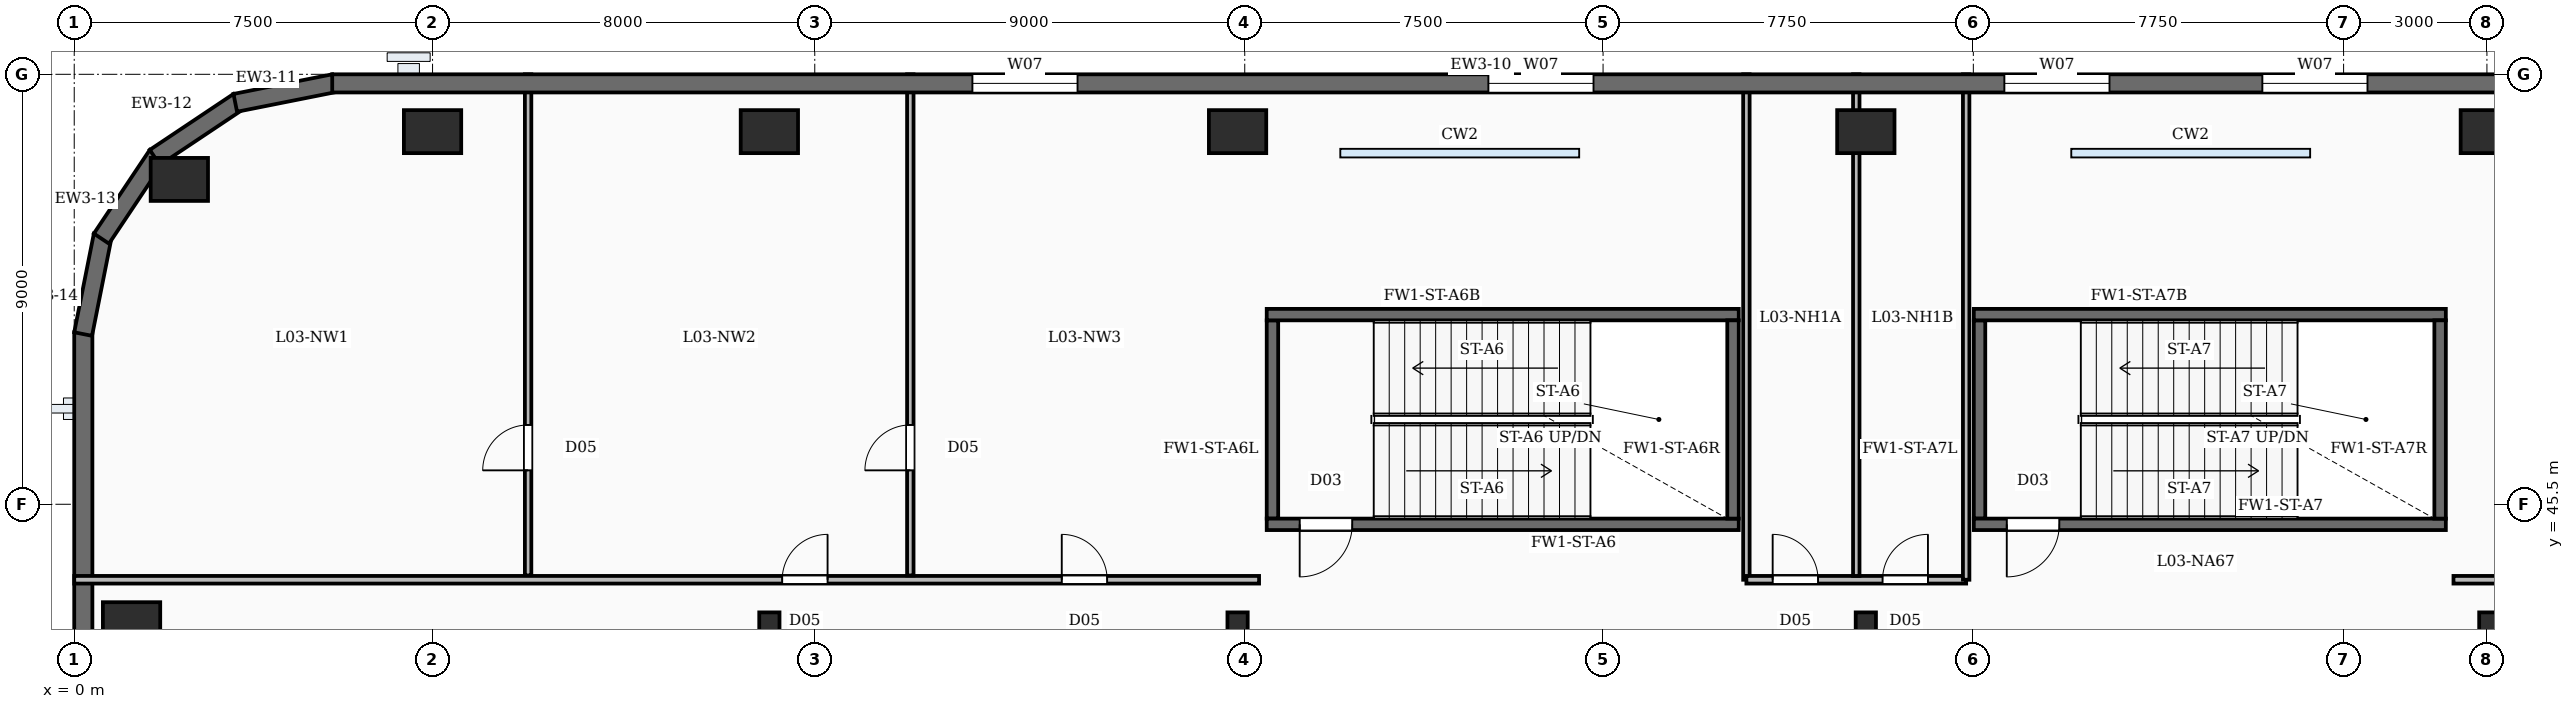
"""IFC4 building model, lengths in metres.
Left out: names, types, materials, properties, quantities, classifications, styles, units other than length and angle.
Written with IfcOpenShell. Run it as: python <this file> out.ifc"""

import sys

from ifc_helpers import new_model, si_unit, direction, frame, frame_2d, origin, origin_2d, place, context, subcontext, project, spatial, rectangle, i_section, extrude, element, fill, save


model = new_model("IFC4")
c1 = context("Model", 3, precision=1e-05, world=origin(), true_north=direction((0.0, 1.0)))
c2 = subcontext(c1, "Body", "Model", "MODEL_VIEW")
j1 = project(units=[si_unit("LENGTHUNIT", "METRE"), si_unit("PLANEANGLEUNIT", "RADIAN")], contexts=[c1])
p1 = place(None, origin())
s1 = spatial("IfcSite", under=j1, at=p1, CompositionType="ELEMENT")
p2 = place(p1, origin())
s2 = spatial("IfcBuilding", under=s1, at=p2, CompositionType="ELEMENT")
p3 = place(p2, frame((0.0, 0.0, 18.0)))
s3 = spatial("IfcBuildingStorey", under=s2, at=p3, CompositionType="ELEMENT", Elevation=18.0)
for number, where, z_axis, x_axis in (
    (1, (50.55, 53.3, -0.35), (0.0, 0.0, 1.0), (1.0, 0.0, 0.0)),
    (2, (37.5, 53.3, -0.35), (0.0, 0.0, 1.0), (1.0, 0.0, 0.0)),
    (3, (24.35, 53.3, -0.35), (0.0, 0.0, 1.0), (1.0, 0.0, 0.0)),
    (4, (14.55, 53.3, -0.35), (0.0, 0.0, 1.0), (1.0, 0.0, 0.0)),
    (5, (7.5, 53.3, -0.35), (0.0, 0.0, 1.0), (1.0, 0.0, 0.0)),
    (6, (2.2, 52.3, -0.35), (0.0, 0.0, 1.0), (1.0, 0.0, 0.0)),
    (7, (1.2, 43.0, -0.35), (0.0, 0.0, 1.0), (1.0, 0.0, 0.0)),
):
    element("IfcColumn", number, at=place(p3, frame(where, z_axis=z_axis, x_axis=x_axis)), inside=s3, PredefinedType="COLUMN", context=c2, shape_type="SweptSolid", body=[
        extrude(rectangle(XDim=1.2, YDim=0.9, at=origin_2d()), origin(), (0.0, 0.0, 1.0), 5.0),
    ])
for number, where, z_axis, x_axis in (
    (8, (14.55, 43.0, -0.35), (0.0, 0.0, 1.0), (1.0, 0.0, 0.0)),
    (9, (24.35, 43.0, -0.35), (0.0, 0.0, 1.0), (1.0, 0.0, 0.0)),
    (10, (37.5, 43.0, -0.35), (0.0, 0.0, 1.0), (1.0, 0.0, 0.0)),
    (11, (50.55, 43.0, -0.35), (0.0, 0.0, 1.0), (1.0, 0.0, 0.0)),
):
    element("IfcColumn", number, at=place(p3, frame(where, z_axis=z_axis, x_axis=x_axis)), inside=s3, PredefinedType="COLUMN", context=c2, shape_type="SweptSolid", body=[
        extrude(i_section(OverallWidth=0.424, OverallDepth=0.474, WebThickness=0.048, FlangeThickness=0.077, FilletRadius=0.02, at=origin_2d()), origin(), (0.0, 0.0, 1.0), 5.0),
    ])
p4 = place(p3, frame((5.4, 54.31, 0.0), z_axis=(0.0, 0.0, 1.0), x_axis=(1.0, 0.0, 0.0)))
e12 = element("IfcWall", 12, at=p4, inside=s3, PredefinedType="SOLIDWALL", context=c2, shape_type="SweptSolid", body=[
    extrude(rectangle(XDim=68.7, YDim=0.38, at=frame_2d((34.35, 0.0))), origin(), (0.0, 0.0, 1.0), 4.65),
])
p5 = place(p4, frame((13.4, 0.0, 0.95)))
e13 = element("IfcOpeningElement", 13, at=p5, cuts=e12, PredefinedType="OPENING", context=c2, shape_type="SweptSolid", body=[
    extrude(rectangle(XDim=2.2, YDim=2.5, at=frame_2d((1.1, 1.25))), frame((0.0, 0.2, 0.0), z_axis=(0.0, -1.0, 0.0), x_axis=(1.0, 0.0, 0.0)), (0.0, 0.0, 1.0), 0.4),
])
p6 = place(p4, frame((24.2, 0.0, 0.95)))
e14 = element("IfcOpeningElement", 14, at=p6, cuts=e12, PredefinedType="OPENING", context=c2, shape_type="SweptSolid", body=[
    extrude(rectangle(XDim=2.2, YDim=2.5, at=frame_2d((1.1, 1.25))), frame((0.0, 0.2, 0.0), z_axis=(0.0, -1.0, 0.0), x_axis=(1.0, 0.0, 0.0)), (0.0, 0.0, 1.0), 0.4),
])
p7 = place(p4, frame((35.0, 0.0, 0.95)))
e15 = element("IfcOpeningElement", 15, at=p7, cuts=e12, PredefinedType="OPENING", context=c2, shape_type="SweptSolid", body=[
    extrude(rectangle(XDim=2.2, YDim=2.5, at=frame_2d((1.1, 1.25))), frame((0.0, 0.2, 0.0), z_axis=(0.0, -1.0, 0.0), x_axis=(1.0, 0.0, 0.0)), (0.0, 0.0, 1.0), 0.4),
])
p8 = place(p4, frame((40.4, 0.0, 0.95)))
e16 = element("IfcOpeningElement", 16, at=p8, cuts=e12, PredefinedType="OPENING", context=c2, shape_type="SweptSolid", body=[
    extrude(rectangle(XDim=2.2, YDim=2.5, at=frame_2d((1.1, 1.25))), frame((0.0, 0.2, 0.0), z_axis=(0.0, -1.0, 0.0), x_axis=(1.0, 0.0, 0.0)), (0.0, 0.0, 1.0), 0.4),
])
p9 = place(p4, frame((56.6, 0.0, 0.95)))
e17 = element("IfcOpeningElement", 17, at=p9, cuts=e12, PredefinedType="OPENING", context=c2, shape_type="SweptSolid", body=[
    extrude(rectangle(XDim=2.2, YDim=2.5, at=frame_2d((1.1, 1.25))), frame((0.0, 0.2, 0.0), z_axis=(0.0, -1.0, 0.0), x_axis=(1.0, 0.0, 0.0)), (0.0, 0.0, 1.0), 0.4),
])
p10 = place(p4, frame((62.0, 0.0, 0.95)))
e18 = element("IfcOpeningElement", 18, at=p10, cuts=e12, PredefinedType="OPENING", context=c2, shape_type="SweptSolid", body=[
    extrude(rectangle(XDim=2.2, YDim=2.5, at=frame_2d((1.1, 1.25))), frame((0.0, 0.2, 0.0), z_axis=(0.0, -1.0, 0.0), x_axis=(1.0, 0.0, 0.0)), (0.0, 0.0, 1.0), 0.4),
])
for number, where, z_axis, x_axis in (
    (19, (3.371, 53.903, 0.0), (0.0, 0.0, 1.0), (0.981, 0.195, 0.0)),
    (20, (1.687, 52.76, 0.0), (0.0, 0.0, 1.0), (0.832, 0.556, 0.0)),
    (21, (0.569, 51.061, 0.0), (0.0, 0.0, 1.0), (0.556, 0.832, 0.0)),
    (22, (0.186, 49.063, 0.0), (0.0, 0.0, 1.0), (0.195, 0.981, 0.0)),
):
    element("IfcWall", number, at=place(p3, frame(where, z_axis=z_axis, x_axis=x_axis)), inside=s3, PredefinedType="SOLIDWALL", context=c2, shape_type="SweptSolid", body=[
        extrude(rectangle(XDim=2.107, YDim=0.38, at=frame_2d((1.053, 0.0))), origin(), (0.0, 0.0, 1.0), 4.65),
    ])
p11 = place(p3, frame((0.19, 5.4, 0.0), z_axis=(0.0, 0.0, 1.0), x_axis=(0.0, 1.0, 0.0)))
e23 = element("IfcWall", 23, at=p11, inside=s3, PredefinedType="SOLIDWALL", context=c2, shape_type="SweptSolid", body=[
    extrude(rectangle(XDim=43.7, YDim=0.38, at=frame_2d((21.85, 0.0))), origin(), (0.0, 0.0, 1.0), 4.65),
])
p12 = place(p11, frame((2.6, 0.0, 0.95)))
e24 = element("IfcOpeningElement", 24, at=p12, cuts=e23, PredefinedType="OPENING", context=c2, shape_type="SweptSolid", body=[
    extrude(rectangle(XDim=2.2, YDim=2.5, at=frame_2d((1.1, 1.25))), frame((0.0, 0.2, 0.0), z_axis=(0.0, -1.0, 0.0), x_axis=(1.0, 0.0, 0.0)), (0.0, 0.0, 1.0), 0.4),
])
p13 = place(p11, frame((8.0, 0.0, 0.95)))
e25 = element("IfcOpeningElement", 25, at=p13, cuts=e23, PredefinedType="OPENING", context=c2, shape_type="SweptSolid", body=[
    extrude(rectangle(XDim=2.2, YDim=2.5, at=frame_2d((1.1, 1.25))), frame((0.0, 0.2, 0.0), z_axis=(0.0, -1.0, 0.0), x_axis=(1.0, 0.0, 0.0)), (0.0, 0.0, 1.0), 0.4),
])
p14 = place(p11, frame((18.8, 0.0, 0.95)))
e26 = element("IfcOpeningElement", 26, at=p14, cuts=e23, PredefinedType="OPENING", context=c2, shape_type="SweptSolid", body=[
    extrude(rectangle(XDim=2.2, YDim=2.5, at=frame_2d((1.1, 1.25))), frame((0.0, 0.2, 0.0), z_axis=(0.0, -1.0, 0.0), x_axis=(1.0, 0.0, 0.0)), (0.0, 0.0, 1.0), 0.4),
])
p15 = place(p11, frame((29.6, 0.0, 0.95)))
e27 = element("IfcOpeningElement", 27, at=p15, cuts=e23, PredefinedType="OPENING", context=c2, shape_type="SweptSolid", body=[
    extrude(rectangle(XDim=2.2, YDim=2.5, at=frame_2d((1.1, 1.25))), frame((0.0, 0.2, 0.0), z_axis=(0.0, -1.0, 0.0), x_axis=(1.0, 0.0, 0.0)), (0.0, 0.0, 1.0), 0.4),
])
p16 = place(p3, frame((34.84, 45.08, 0.0), z_axis=(0.0, 0.0, 1.0), x_axis=(-1.0, 0.0, 0.0)))
e28 = element("IfcWall", 28, at=p16, inside=s3, PredefinedType="SOLIDWALL", context=c2, shape_type="SweptSolid", body=[
    extrude(rectangle(XDim=9.88, YDim=0.24, at=frame_2d((4.94, 0.0))), origin(), (0.0, 0.0, 1.0), 4.65),
])
p17 = place(p16, frame((8.09, 0.0, 0.0)))
e29 = element("IfcOpeningElement", 29, at=p17, cuts=e28, PredefinedType="OPENING", context=c2, shape_type="SweptSolid", body=[
    extrude(rectangle(XDim=1.1, YDim=2.15, at=frame_2d((0.55, 1.075))), frame((0.0, 0.13, 0.0), z_axis=(0.0, -1.0, 0.0), x_axis=(1.0, 0.0, 0.0)), (0.0, 0.0, 1.0), 0.26),
])
p18 = place(p3, frame((24.96, 49.47, 0.0), z_axis=(0.0, 0.0, 1.0), x_axis=(1.0, 0.0, 0.0)))
e30 = element("IfcWall", 30, at=p18, inside=s3, PredefinedType="SOLIDWALL", context=c2, shape_type="SweptSolid", body=[
    extrude(rectangle(XDim=9.88, YDim=0.24, at=frame_2d((4.94, 0.0))), origin(), (0.0, 0.0, 1.0), 4.65),
])
for number, where, z_axis, x_axis in (
    (31, (25.08, 45.2, 0.0), (0.0, 0.0, 1.0), (0.0, 1.0, 0.0)),
    (32, (34.72, 45.2, 0.0), (0.0, 0.0, 1.0), (0.0, 1.0, 0.0)),
):
    element("IfcWall", number, at=place(p3, frame(where, z_axis=z_axis, x_axis=x_axis)), inside=s3, PredefinedType="SOLIDWALL", context=c2, shape_type="SweptSolid", body=[
        extrude(rectangle(XDim=4.15, YDim=0.24, at=frame_2d((2.075, 0.0))), origin(), (0.0, 0.0, 1.0), 4.65),
    ])
p19 = place(p3, frame((49.64, 45.08, 0.0), z_axis=(0.0, 0.0, 1.0), x_axis=(-1.0, 0.0, 0.0)))
e33 = element("IfcWall", 33, at=p19, inside=s3, PredefinedType="SOLIDWALL", context=c2, shape_type="SweptSolid", body=[
    extrude(rectangle(XDim=9.88, YDim=0.24, at=frame_2d((4.94, 0.0))), origin(), (0.0, 0.0, 1.0), 4.65),
])
p20 = place(p19, frame((8.09, 0.0, 0.0)))
e34 = element("IfcOpeningElement", 34, at=p20, cuts=e33, PredefinedType="OPENING", context=c2, shape_type="SweptSolid", body=[
    extrude(rectangle(XDim=1.1, YDim=2.15, at=frame_2d((0.55, 1.075))), frame((0.0, 0.13, 0.0), z_axis=(0.0, -1.0, 0.0), x_axis=(1.0, 0.0, 0.0)), (0.0, 0.0, 1.0), 0.26),
])
p21 = place(p3, frame((39.76, 49.47, 0.0), z_axis=(0.0, 0.0, 1.0), x_axis=(1.0, 0.0, 0.0)))
e35 = element("IfcWall", 35, at=p21, inside=s3, PredefinedType="SOLIDWALL", context=c2, shape_type="SweptSolid", body=[
    extrude(rectangle(XDim=9.88, YDim=0.24, at=frame_2d((4.94, 0.0))), origin(), (0.0, 0.0, 1.0), 4.65),
])
for number, where, z_axis, x_axis in (
    (36, (39.88, 45.2, 0.0), (0.0, 0.0, 1.0), (0.0, 1.0, 0.0)),
    (37, (49.52, 45.2, 0.0), (0.0, 0.0, 1.0), (0.0, 1.0, 0.0)),
):
    element("IfcWall", number, at=place(p3, frame(where, z_axis=z_axis, x_axis=x_axis)), inside=s3, PredefinedType="SOLIDWALL", context=c2, shape_type="SweptSolid", body=[
        extrude(rectangle(XDim=4.15, YDim=0.24, at=frame_2d((2.075, 0.0))), origin(), (0.0, 0.0, 1.0), 4.65),
    ])
p22 = place(p3, frame((9.5, 44.01, 0.0), z_axis=(0.0, 0.0, 1.0), x_axis=(0.0, 1.0, 0.0)))
e38 = element("IfcWall", 38, at=p22, inside=s3, PredefinedType="PARTITIONING", context=c2, shape_type="SweptSolid", body=[
    extrude(rectangle(XDim=10.49, YDim=0.135, at=frame_2d((5.245, 0.0))), origin(), (0.0, 0.0, 1.0), 3.71),
])
p23 = place(p22, frame((2.2, 0.0, 0.0)))
e39 = element("IfcOpeningElement", 39, at=p23, cuts=e38, PredefinedType="OPENING", context=c2, shape_type="SweptSolid", body=[
    extrude(rectangle(XDim=0.95, YDim=2.15, at=frame_2d((0.475, 1.075))), frame((0.0, 0.077, 0.0), z_axis=(0.0, -1.0, 0.0), x_axis=(1.0, 0.0, 0.0)), (0.0, 0.0, 1.0), 0.155),
])
p24 = place(p3, frame((17.5, 44.01, 0.0), z_axis=(0.0, 0.0, 1.0), x_axis=(0.0, 1.0, 0.0)))
e40 = element("IfcWall", 40, at=p24, inside=s3, PredefinedType="PARTITIONING", context=c2, shape_type="SweptSolid", body=[
    extrude(rectangle(XDim=10.49, YDim=0.135, at=frame_2d((5.245, 0.0))), origin(), (0.0, 0.0, 1.0), 3.71),
])
p25 = place(p24, frame((2.2, 0.0, 0.0)))
e41 = element("IfcOpeningElement", 41, at=p25, cuts=e40, PredefinedType="OPENING", context=c2, shape_type="SweptSolid", body=[
    extrude(rectangle(XDim=0.95, YDim=2.15, at=frame_2d((0.475, 1.075))), frame((0.0, 0.077, 0.0), z_axis=(0.0, -1.0, 0.0), x_axis=(1.0, 0.0, 0.0)), (0.0, 0.0, 1.0), 0.155),
])
p26 = place(p3, frame((0.0, 43.92, 0.0), z_axis=(0.0, 0.0, 1.0), x_axis=(1.0, 0.0, 0.0)))
e42 = element("IfcWall", 42, at=p26, inside=s3, PredefinedType="PARTITIONING", context=c2, shape_type="SweptSolid", body=[
    extrude(rectangle(XDim=24.8, YDim=0.16, at=frame_2d((12.4, 0.0))), origin(), (0.0, 0.0, 1.0), 3.71),
])
p27 = place(p26, frame((14.818, 0.0, 0.0)))
e43 = element("IfcOpeningElement", 43, at=p27, cuts=e42, PredefinedType="OPENING", context=c2, shape_type="SweptSolid", body=[
    extrude(rectangle(XDim=0.95, YDim=2.15, at=frame_2d((0.475, 1.075))), frame((0.0, 0.09, 0.0), z_axis=(0.0, -1.0, 0.0), x_axis=(1.0, 0.0, 0.0)), (0.0, 0.0, 1.0), 0.18),
])
p28 = place(p26, frame((20.67, 0.0, 0.0)))
e44 = element("IfcOpeningElement", 44, at=p28, cuts=e42, PredefinedType="OPENING", context=c2, shape_type="SweptSolid", body=[
    extrude(rectangle(XDim=0.95, YDim=2.15, at=frame_2d((0.475, 1.075))), frame((0.0, 0.09, 0.0), z_axis=(0.0, -1.0, 0.0), x_axis=(1.0, 0.0, 0.0)), (0.0, 0.0, 1.0), 0.18),
])
p29 = place(p3, frame((49.8, 43.92, 0.0), z_axis=(0.0, 0.0, 1.0), x_axis=(1.0, 0.0, 0.0)))
e45 = element("IfcWall", 45, at=p29, inside=s3, PredefinedType="PARTITIONING", context=c2, shape_type="SweptSolid", body=[
    extrude(rectangle(XDim=29.7, YDim=0.16, at=frame_2d((14.85, 0.0))), origin(), (0.0, 0.0, 1.0), 3.71),
])
p30 = place(p29, frame((3.62, 0.0, 0.0)))
e46 = element("IfcOpeningElement", 46, at=p30, cuts=e45, PredefinedType="OPENING", context=c2, shape_type="SweptSolid", body=[
    extrude(rectangle(XDim=0.95, YDim=2.15, at=frame_2d((0.475, 1.075))), frame((0.0, 0.09, 0.0), z_axis=(0.0, -1.0, 0.0), x_axis=(1.0, 0.0, 0.0)), (0.0, 0.0, 1.0), 0.18),
])
p31 = place(p29, frame((11.97, 0.0, 0.0)))
e47 = element("IfcOpeningElement", 47, at=p31, cuts=e45, PredefinedType="OPENING", context=c2, shape_type="SweptSolid", body=[
    extrude(rectangle(XDim=0.95, YDim=2.15, at=frame_2d((0.475, 1.075))), frame((0.0, 0.09, 0.0), z_axis=(0.0, -1.0, 0.0), x_axis=(1.0, 0.0, 0.0)), (0.0, 0.0, 1.0), 0.18),
])
p32 = place(p29, frame((19.52, 0.0, 0.0)))
e48 = element("IfcOpeningElement", 48, at=p32, cuts=e45, PredefinedType="OPENING", context=c2, shape_type="SweptSolid", body=[
    extrude(rectangle(XDim=0.95, YDim=2.15, at=frame_2d((0.475, 1.075))), frame((0.0, 0.09, 0.0), z_axis=(0.0, -1.0, 0.0), x_axis=(1.0, 0.0, 0.0)), (0.0, 0.0, 1.0), 0.18),
])
p33 = place(p3, frame((35.0, 43.92, 0.0), z_axis=(0.0, 0.0, 1.0), x_axis=(1.0, 0.0, 0.0)))
e49 = element("IfcWall", 49, at=p33, inside=s3, PredefinedType="PARTITIONING", context=c2, shape_type="SweptSolid", body=[
    extrude(rectangle(XDim=4.6, YDim=0.16, at=frame_2d((2.3, 0.0))), origin(), (0.0, 0.0, 1.0), 3.71),
])
p34 = place(p33, frame((0.55, 0.0, 0.0)))
e50 = element("IfcOpeningElement", 50, at=p34, cuts=e49, PredefinedType="OPENING", context=c2, shape_type="SweptSolid", body=[
    extrude(rectangle(XDim=0.95, YDim=2.15, at=frame_2d((0.475, 1.075))), frame((0.0, 0.09, 0.0), z_axis=(0.0, -1.0, 0.0), x_axis=(1.0, 0.0, 0.0)), (0.0, 0.0, 1.0), 0.18),
])
p35 = place(p33, frame((2.85, 0.0, 0.0)))
e51 = element("IfcOpeningElement", 51, at=p35, cuts=e49, PredefinedType="OPENING", context=c2, shape_type="SweptSolid", body=[
    extrude(rectangle(XDim=0.95, YDim=2.15, at=frame_2d((0.475, 1.075))), frame((0.0, 0.09, 0.0), z_axis=(0.0, -1.0, 0.0), x_axis=(1.0, 0.0, 0.0)), (0.0, 0.0, 1.0), 0.18),
])
p36 = place(p3, frame((37.3, 44.0, 0.0), z_axis=(0.0, 0.0, 1.0), x_axis=(0.0, 1.0, 0.0)))
e52 = element("IfcWall", 52, at=p36, inside=s3, PredefinedType="PARTITIONING", context=c2, shape_type="SweptSolid", body=[
    extrude(rectangle(XDim=10.5, YDim=0.135, at=frame_2d((5.25, 0.0))), origin(), (0.0, 0.0, 1.0), 3.71),
])
for number, where, z_axis, x_axis in (
    (53, (35.0, 43.92, 0.0), (0.0, 0.0, 1.0), (0.0, 1.0, 0.0)),
    (54, (39.6, 43.92, 0.0), (0.0, 0.0, 1.0), (0.0, 1.0, 0.0)),
):
    element("IfcWall", number, at=place(p3, frame(where, z_axis=z_axis, x_axis=x_axis)), inside=s3, PredefinedType="PARTITIONING", context=c2, shape_type="SweptSolid", body=[
        extrude(rectangle(XDim=10.58, YDim=0.135, at=frame_2d((5.29, 0.0))), origin(), (0.0, 0.0, 1.0), 3.71),
    ])
p37 = place(p5, origin())
e55 = element("IfcWindow", 55, at=p37, inside=s3, PartitioningType="DOUBLE_PANEL_VERTICAL", PredefinedType="WINDOW", context=c2, shape_type="SweptSolid", body=[
    extrude(rectangle(XDim=2.2, YDim=2.5, at=frame_2d((1.1, 1.25))), frame((0.0, 0.03, 0.0), z_axis=(0.0, -1.0, 0.0), x_axis=(1.0, 0.0, 0.0)), (0.0, 0.0, 1.0), 0.06),
])
fill(e13, e55)
p38 = place(p6, origin())
e56 = element("IfcWindow", 56, at=p38, inside=s3, PartitioningType="DOUBLE_PANEL_VERTICAL", PredefinedType="WINDOW", context=c2, shape_type="SweptSolid", body=[
    extrude(rectangle(XDim=2.2, YDim=2.5, at=frame_2d((1.1, 1.25))), frame((0.0, 0.03, 0.0), z_axis=(0.0, -1.0, 0.0), x_axis=(1.0, 0.0, 0.0)), (0.0, 0.0, 1.0), 0.06),
])
fill(e14, e56)
p39 = place(p7, origin())
e57 = element("IfcWindow", 57, at=p39, inside=s3, PartitioningType="DOUBLE_PANEL_VERTICAL", PredefinedType="WINDOW", context=c2, shape_type="SweptSolid", body=[
    extrude(rectangle(XDim=2.2, YDim=2.5, at=frame_2d((1.1, 1.25))), frame((0.0, 0.03, 0.0), z_axis=(0.0, -1.0, 0.0), x_axis=(1.0, 0.0, 0.0)), (0.0, 0.0, 1.0), 0.06),
])
fill(e15, e57)
p40 = place(p8, origin())
e58 = element("IfcWindow", 58, at=p40, inside=s3, PartitioningType="DOUBLE_PANEL_VERTICAL", PredefinedType="WINDOW", context=c2, shape_type="SweptSolid", body=[
    extrude(rectangle(XDim=2.2, YDim=2.5, at=frame_2d((1.1, 1.25))), frame((0.0, 0.03, 0.0), z_axis=(0.0, -1.0, 0.0), x_axis=(1.0, 0.0, 0.0)), (0.0, 0.0, 1.0), 0.06),
])
fill(e16, e58)
p41 = place(p17, origin())
e59 = element("IfcDoor", 59, at=p41, inside=s3, OperationType="SINGLE_SWING_RIGHT", PredefinedType="DOOR", context=c2, shape_type="SweptSolid", body=[
    extrude(rectangle(XDim=1.1, YDim=2.15, at=frame_2d((0.55, 1.075))), frame((0.0, 0.025, 0.0), z_axis=(0.0, -1.0, 0.0), x_axis=(1.0, 0.0, 0.0)), (0.0, 0.0, 1.0), 0.05),
])
fill(e29, e59)
p42 = place(p20, origin())
e60 = element("IfcDoor", 60, at=p42, inside=s3, OperationType="SINGLE_SWING_RIGHT", PredefinedType="DOOR", context=c2, shape_type="SweptSolid", body=[
    extrude(rectangle(XDim=1.1, YDim=2.15, at=frame_2d((0.55, 1.075))), frame((0.0, 0.025, 0.0), z_axis=(0.0, -1.0, 0.0), x_axis=(1.0, 0.0, 0.0)), (0.0, 0.0, 1.0), 0.05),
])
fill(e34, e60)
p43 = place(p23, origin())
e61 = element("IfcDoor", 61, at=p43, inside=s3, OperationType="SINGLE_SWING_LEFT", PredefinedType="DOOR", context=c2, shape_type="SweptSolid", body=[
    extrude(rectangle(XDim=0.95, YDim=2.15, at=frame_2d((0.475, 1.075))), frame((0.0, 0.025, 0.0), z_axis=(0.0, -1.0, 0.0), x_axis=(1.0, 0.0, 0.0)), (0.0, 0.0, 1.0), 0.05),
])
fill(e39, e61)
p44 = place(p25, origin())
e62 = element("IfcDoor", 62, at=p44, inside=s3, OperationType="SINGLE_SWING_LEFT", PredefinedType="DOOR", context=c2, shape_type="SweptSolid", body=[
    extrude(rectangle(XDim=0.95, YDim=2.15, at=frame_2d((0.475, 1.075))), frame((0.0, 0.025, 0.0), z_axis=(0.0, -1.0, 0.0), x_axis=(1.0, 0.0, 0.0)), (0.0, 0.0, 1.0), 0.05),
])
fill(e41, e62)
p45 = place(p27, origin())
e63 = element("IfcDoor", 63, at=p45, inside=s3, OperationType="SINGLE_SWING_RIGHT", PredefinedType="DOOR", context=c2, shape_type="SweptSolid", body=[
    extrude(rectangle(XDim=0.95, YDim=2.15, at=frame_2d((0.475, 1.075))), frame((0.0, 0.025, 0.0), z_axis=(0.0, -1.0, 0.0), x_axis=(1.0, 0.0, 0.0)), (0.0, 0.0, 1.0), 0.05),
])
fill(e43, e63)
p46 = place(p28, origin())
e64 = element("IfcDoor", 64, at=p46, inside=s3, OperationType="SINGLE_SWING_LEFT", PredefinedType="DOOR", context=c2, shape_type="SweptSolid", body=[
    extrude(rectangle(XDim=0.95, YDim=2.15, at=frame_2d((0.475, 1.075))), frame((0.0, 0.025, 0.0), z_axis=(0.0, -1.0, 0.0), x_axis=(1.0, 0.0, 0.0)), (0.0, 0.0, 1.0), 0.05),
])
fill(e44, e64)
p47 = place(p34, origin())
e65 = element("IfcDoor", 65, at=p47, inside=s3, OperationType="SINGLE_SWING_LEFT", PredefinedType="DOOR", context=c2, shape_type="SweptSolid", body=[
    extrude(rectangle(XDim=0.95, YDim=2.15, at=frame_2d((0.475, 1.075))), frame((0.0, 0.025, 0.0), z_axis=(0.0, -1.0, 0.0), x_axis=(1.0, 0.0, 0.0)), (0.0, 0.0, 1.0), 0.05),
])
fill(e50, e65)
p48 = place(p35, origin())
e66 = element("IfcDoor", 66, at=p48, inside=s3, OperationType="SINGLE_SWING_RIGHT", PredefinedType="DOOR", context=c2, shape_type="SweptSolid", body=[
    extrude(rectangle(XDim=0.95, YDim=2.15, at=frame_2d((0.475, 1.075))), frame((0.0, 0.025, 0.0), z_axis=(0.0, -1.0, 0.0), x_axis=(1.0, 0.0, 0.0)), (0.0, 0.0, 1.0), 0.05),
])
fill(e51, e66)
save(model, sys.argv[1])
